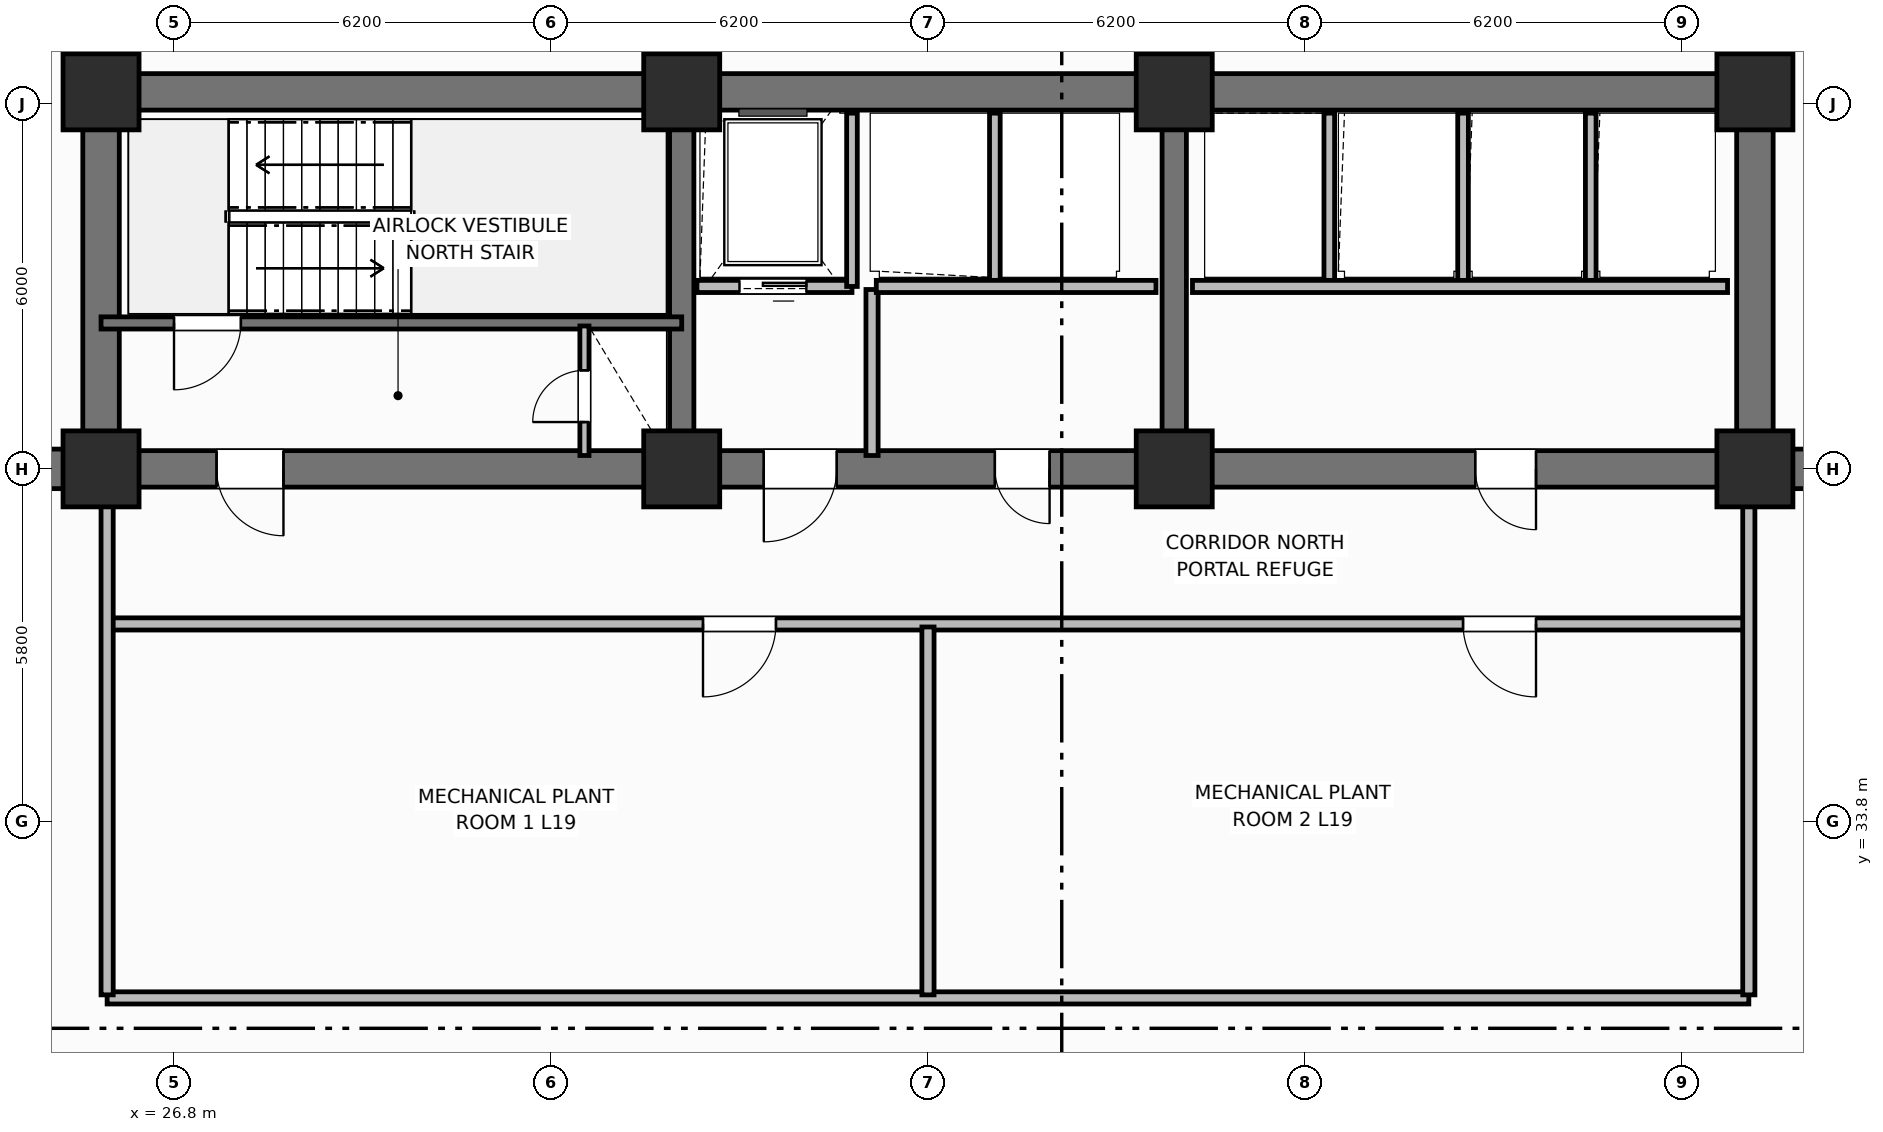
"""IFC4 building model, lengths in metres.
Left out: names, types, materials, properties, quantities, classifications, styles, units other than length and angle.
Written with IfcOpenShell. Run it as: python <this file> out.ifc"""

import sys

from ifc_helpers import new_model, si_unit, direction, frame, frame_2d, origin, origin_2d, place, context, subcontext, project, spatial, rectangle, extrude, element, fill, save


model = new_model("IFC4")
c1 = context("Model", 3, precision=1e-05, world=origin(), true_north=direction((0.0, 1.0)))
c2 = subcontext(c1, "Body", "Model", "MODEL_VIEW")
j1 = project(units=[si_unit("LENGTHUNIT", "METRE"), si_unit("PLANEANGLEUNIT", "RADIAN")], contexts=[c1])
p1 = place(None, origin())
s1 = spatial("IfcSite", under=j1, at=p1, CompositionType="ELEMENT")
p2 = place(p1, origin())
s2 = spatial("IfcBuilding", under=s1, at=p2, CompositionType="ELEMENT")
p3 = place(p2, frame((0.0, 0.0, 76.9)))
s3 = spatial("IfcBuildingStorey", under=s2, at=p3, CompositionType="ELEMENT", Elevation=76.9)
p4 = place(p3, frame((25.6, 45.8, 0.0), z_axis=(0.0, 0.0, 1.0), x_axis=(1.0, 0.0, 0.0)))
e1 = element("IfcWall", 1, at=p4, inside=s3, PredefinedType="SHEAR", context=c2, shape_type="SweptSolid", body=[
    extrude(rectangle(XDim=27.2, YDim=0.6, at=frame_2d((13.6, 0.0))), origin(), (0.0, 0.0, 1.0), 7.2),
])
for number, where, z_axis, x_axis in (
    (2, (25.6, 39.9, 0.0), (0.0, 0.0, 1.0), (0.0, 1.0, 0.0)),
    (3, (52.8, 39.9, 0.0), (0.0, 0.0, 1.0), (0.0, 1.0, 0.0)),
):
    element("IfcWall", number, at=place(p3, frame(where, z_axis=z_axis, x_axis=x_axis)), inside=s3, PredefinedType="SHEAR", context=c2, shape_type="SweptSolid", body=[
        extrude(rectangle(XDim=5.6, YDim=0.6, at=frame_2d((2.8, 0.0))), origin(), (0.0, 0.0, 1.0), 7.2),
    ])
p5 = place(p3, frame((52.8, 39.6, 0.0), z_axis=(0.0, 0.0, 1.0), x_axis=(-1.0, 0.0, 0.0)))
e4 = element("IfcWall", 4, at=p5, inside=s3, PredefinedType="SHEAR", context=c2, shape_type="SweptSolid", body=[
    extrude(rectangle(XDim=27.2, YDim=0.6, at=frame_2d((13.6, 0.0))), origin(), (0.0, 0.0, 1.0), 7.2),
])
p6 = place(p5, frame((24.2, 0.0, 0.0)))
e5 = element("IfcOpeningElement", 5, at=p6, cuts=e4, PredefinedType="OPENING", context=c2, shape_type="SweptSolid", body=[
    extrude(rectangle(XDim=1.1, YDim=2.15, at=frame_2d((0.55, 1.075))), frame((0.0, 0.31, 0.0), z_axis=(0.0, -1.0, 0.0), x_axis=(1.0, 0.0, 0.0)), (0.0, 0.0, 1.0), 0.62),
])
p7 = place(p5, frame((15.1, 0.0, 0.0)))
e6 = element("IfcOpeningElement", 6, at=p7, cuts=e4, PredefinedType="OPENING", context=c2, shape_type="SweptSolid", body=[
    extrude(rectangle(XDim=1.2, YDim=2.15, at=frame_2d((0.6, 1.075))), frame((0.0, 0.31, 0.0), z_axis=(0.0, -1.0, 0.0), x_axis=(1.0, 0.0, 0.0)), (0.0, 0.0, 1.0), 0.62),
])
p8 = place(p5, frame((11.6, 0.0, 0.0)))
e7 = element("IfcOpeningElement", 7, at=p8, cuts=e4, PredefinedType="OPENING", context=c2, shape_type="SweptSolid", body=[
    extrude(rectangle(XDim=0.9, YDim=2.1, at=frame_2d((0.45, 1.05))), frame((0.0, 0.31, 0.0), z_axis=(0.0, -1.0, 0.0), x_axis=(1.0, 0.0, 0.0)), (0.0, 0.0, 1.0), 0.62),
])
p9 = place(p5, frame((3.6, 0.0, 0.0)))
e8 = element("IfcOpeningElement", 8, at=p9, cuts=e4, PredefinedType="OPENING", context=c2, shape_type="SweptSolid", body=[
    extrude(rectangle(XDim=1.0, YDim=2.15, at=frame_2d((0.5, 1.075))), frame((0.0, 0.31, 0.0), z_axis=(0.0, -1.0, 0.0), x_axis=(1.0, 0.0, 0.0)), (0.0, 0.0, 1.0), 0.62),
])
for number, where, z_axis, x_axis in (
    (9, (35.15, 39.9, 0.0), (0.0, 0.0, 1.0), (0.0, 1.0, 0.0)),
    (10, (43.25, 39.9, 0.0), (0.0, 0.0, 1.0), (0.0, 1.0, 0.0)),
):
    element("IfcWall", number, at=place(p3, frame(where, z_axis=z_axis, x_axis=x_axis)), inside=s3, PredefinedType="SHEAR", context=c2, shape_type="SweptSolid", body=[
        extrude(rectangle(XDim=5.6, YDim=0.4, at=frame_2d((2.8, 0.0))), origin(), (0.0, 0.0, 1.0), 7.2),
    ])
for number, where, z_axis, x_axis in (
    (11, (25.6, 39.6, 0.0), (0.0, 0.0, 1.0), (1.0, 0.0, 0.0)),
    (12, (25.6, 45.8, 0.0), (0.0, 0.0, 1.0), (1.0, 0.0, 0.0)),
    (13, (35.15, 39.6, 0.0), (0.0, 0.0, 1.0), (1.0, 0.0, 0.0)),
    (14, (35.15, 45.8, 0.0), (0.0, 0.0, 1.0), (1.0, 0.0, 0.0)),
    (15, (43.25, 39.6, 0.0), (0.0, 0.0, 1.0), (1.0, 0.0, 0.0)),
    (16, (43.25, 45.8, 0.0), (0.0, 0.0, 1.0), (1.0, 0.0, 0.0)),
    (17, (52.8, 39.6, 0.0), (0.0, 0.0, 1.0), (1.0, 0.0, 0.0)),
    (18, (52.8, 45.8, 0.0), (0.0, 0.0, 1.0), (1.0, 0.0, 0.0)),
):
    element("IfcColumn", number, at=place(p3, frame(where, z_axis=z_axis, x_axis=x_axis)), inside=s3, PredefinedType="COLUMN", context=c2, shape_type="SweptSolid", body=[
        extrude(rectangle(XDim=1.25, YDim=1.25, at=origin_2d()), origin(), (0.0, 0.0, 1.0), 7.2),
    ])
for number, where, z_axis, x_axis in (
    (19, (15.05, 39.6, 0.0), (0.0, 0.0, 1.0), (1.0, 0.0, 0.0)),
    (20, (52.8, 39.6, 0.0), (0.0, 0.0, 1.0), (1.0, 0.0, 0.0)),
):
    element("IfcWall", number, at=place(p3, frame(where, z_axis=z_axis, x_axis=x_axis)), inside=s3, PredefinedType="SHEAR", context=c2, shape_type="SweptSolid", body=[
        extrude(rectangle(XDim=10.55, YDim=0.65, at=frame_2d((5.275, 0.0))), origin(), (0.0, 0.0, 1.0), 6.92),
    ])
p10 = place(p3, frame((35.15, 42.0, 0.0), z_axis=(0.0, 0.0, 1.0), x_axis=(-1.0, 0.0, 0.0)))
e21 = element("IfcWall", 21, at=p10, inside=s3, PredefinedType="SHEAR", context=c2, shape_type="SweptSolid", body=[
    extrude(rectangle(XDim=9.55, YDim=0.2, at=frame_2d((4.775, 0.0))), origin(), (0.0, 0.0, 1.0), 7.2),
])
p11 = place(p10, frame((7.25, 0.0, 0.0)))
e22 = element("IfcOpeningElement", 22, at=p11, cuts=e21, PredefinedType="OPENING", context=c2, shape_type="SweptSolid", body=[
    extrude(rectangle(XDim=1.1, YDim=2.15, at=frame_2d((0.55, 1.075))), frame((0.0, 0.11, 0.0), z_axis=(0.0, -1.0, 0.0), x_axis=(1.0, 0.0, 0.0)), (0.0, 0.0, 1.0), 0.22),
])
p12 = place(p3, frame((33.55, 39.82, 0.0), z_axis=(0.0, 0.0, 1.0), x_axis=(0.0, 1.0, 0.0)))
e23 = element("IfcWall", 23, at=p12, inside=s3, PredefinedType="PARTITIONING", context=c2, shape_type="SweptSolid", body=[
    extrude(rectangle(XDim=2.13, YDim=0.15, at=frame_2d((1.065, 0.0))), origin(), (0.0, 0.0, 1.0), 5.98),
])
p13 = place(p12, frame((0.55, 0.0, 0.0)))
e24 = element("IfcOpeningElement", 24, at=p13, cuts=e23, PredefinedType="OPENING", context=c2, shape_type="SweptSolid", body=[
    extrude(rectangle(XDim=0.85, YDim=2.05, at=frame_2d((0.425, 1.025))), frame((0.0, 0.085, 0.0), z_axis=(0.0, -1.0, 0.0), x_axis=(1.0, 0.0, 0.0)), (0.0, 0.0, 1.0), 0.17),
])
p14 = place(p3, frame((37.95, 42.6, 0.0), z_axis=(0.0, 0.0, 1.0), x_axis=(-1.0, 0.0, 0.0)))
e25 = element("IfcWall", 25, at=p14, inside=s3, PredefinedType="PARTITIONING", context=c2, shape_type="SweptSolid", body=[
    extrude(rectangle(XDim=2.55, YDim=0.2, at=frame_2d((1.275, 0.0))), origin(), (0.0, 0.0, 1.0), 5.8),
])
p15 = place(p14, frame((0.75, 0.0, 0.0)))
e26 = element("IfcOpeningElement", 26, at=p15, cuts=e25, PredefinedType="OPENING", context=c2, shape_type="SweptSolid", body=[
    extrude(rectangle(XDim=1.1, YDim=2.15, at=frame_2d((0.55, 1.075))), frame((0.0, 0.11, 0.0), z_axis=(0.0, -1.0, 0.0), x_axis=(1.0, 0.0, 0.0)), (0.0, 0.0, 1.0), 0.22),
])
p16 = place(p3, frame((37.95, 42.6, 0.0), z_axis=(0.0, 0.0, 1.0), x_axis=(0.0, 1.0, 0.0)))
e27 = element("IfcWall", 27, at=p16, inside=s3, PredefinedType="PARTITIONING", context=c2, shape_type="SweptSolid", body=[
    extrude(rectangle(XDim=2.85, YDim=0.175, at=frame_2d((1.425, 0.0))), origin(), (0.0, 0.0, 1.0), 5.98),
])
p17 = place(p3, frame((38.28, 39.82, 0.0), z_axis=(0.0, 0.0, 1.0), x_axis=(0.0, 1.0, 0.0)))
e28 = element("IfcWall", 28, at=p17, inside=s3, PredefinedType="PARTITIONING", context=c2, shape_type="SweptSolid", body=[
    extrude(rectangle(XDim=2.73, YDim=0.2, at=frame_2d((1.365, 0.0))), origin(), (0.0, 0.0, 1.0), 5.98),
])
p18 = place(p3, frame((40.3, 42.65, 0.0), z_axis=(0.0, 0.0, 1.0), x_axis=(0.0, 1.0, 0.0)))
e29 = element("IfcWall", 29, at=p18, inside=s3, PredefinedType="PARTITIONING", context=c2, shape_type="SweptSolid", body=[
    extrude(rectangle(XDim=2.8, YDim=0.175, at=frame_2d((1.4, 0.0))), origin(), (0.0, 0.0, 1.0), 5.98),
])
p19 = place(p3, frame((42.95, 42.6, 0.0), z_axis=(0.0, 0.0, 1.0), x_axis=(-1.0, 0.0, 0.0)))
e30 = element("IfcWall", 30, at=p19, inside=s3, PredefinedType="PARTITIONING", context=c2, shape_type="SweptSolid", body=[
    extrude(rectangle(XDim=4.6, YDim=0.2, at=frame_2d((2.3, 0.0))), origin(), (0.0, 0.0, 1.0), 5.8),
])
for number, where, z_axis, x_axis in (
    (31, (45.8, 42.65, 0.0), (0.0, 0.0, 1.0), (0.0, 1.0, 0.0)),
    (32, (48.0, 42.65, 0.0), (0.0, 0.0, 1.0), (0.0, 1.0, 0.0)),
    (33, (50.1, 42.65, 0.0), (0.0, 0.0, 1.0), (0.0, 1.0, 0.0)),
):
    element("IfcWall", number, at=place(p3, frame(where, z_axis=z_axis, x_axis=x_axis)), inside=s3, PredefinedType="PARTITIONING", context=c2, shape_type="SweptSolid", body=[
        extrude(rectangle(XDim=2.8, YDim=0.175, at=frame_2d((1.4, 0.0))), origin(), (0.0, 0.0, 1.0), 5.98),
    ])
p20 = place(p3, frame((52.35, 42.6, 0.0), z_axis=(0.0, 0.0, 1.0), x_axis=(-1.0, 0.0, 0.0)))
e34 = element("IfcWall", 34, at=p20, inside=s3, PredefinedType="PARTITIONING", context=c2, shape_type="SweptSolid", body=[
    extrude(rectangle(XDim=8.8, YDim=0.2, at=frame_2d((4.4, 0.0))), origin(), (0.0, 0.0, 1.0), 5.98),
])
p21 = place(p3, frame((52.7, 37.05, 0.0), z_axis=(0.0, 0.0, 1.0), x_axis=(-1.0, 0.0, 0.0)))
e35 = element("IfcWall", 35, at=p21, inside=s3, PredefinedType="PARTITIONING", context=c2, shape_type="SweptSolid", body=[
    extrude(rectangle(XDim=27.0, YDim=0.2, at=frame_2d((13.5, 0.0))), origin(), (0.0, 0.0, 1.0), 5.98),
])
p22 = place(p21, frame((3.5, 0.0, 0.0)))
e36 = element("IfcOpeningElement", 36, at=p22, cuts=e35, PredefinedType="OPENING", context=c2, shape_type="SweptSolid", body=[
    extrude(rectangle(XDim=1.2, YDim=2.15, at=frame_2d((0.6, 1.075))), frame((0.0, 0.11, 0.0), z_axis=(0.0, -1.0, 0.0), x_axis=(1.0, 0.0, 0.0)), (0.0, 0.0, 1.0), 0.22),
])
p23 = place(p21, frame((16.0, 0.0, 0.0)))
e37 = element("IfcOpeningElement", 37, at=p23, cuts=e35, PredefinedType="OPENING", context=c2, shape_type="SweptSolid", body=[
    extrude(rectangle(XDim=1.2, YDim=2.15, at=frame_2d((0.6, 1.075))), frame((0.0, 0.11, 0.0), z_axis=(0.0, -1.0, 0.0), x_axis=(1.0, 0.0, 0.0)), (0.0, 0.0, 1.0), 0.22),
])
p24 = place(p3, frame((25.7, 30.9, 0.0), z_axis=(0.0, 0.0, 1.0), x_axis=(1.0, 0.0, 0.0)))
e38 = element("IfcWall", 38, at=p24, inside=s3, PredefinedType="PARTITIONING", context=c2, shape_type="SweptSolid", body=[
    extrude(rectangle(XDim=27.0, YDim=0.2, at=frame_2d((13.5, 0.0))), origin(), (0.0, 0.0, 1.0), 5.98),
])
p25 = place(p3, frame((39.2, 30.95, 0.0), z_axis=(0.0, 0.0, 1.0), x_axis=(0.0, 1.0, 0.0)))
e39 = element("IfcWall", 39, at=p25, inside=s3, PredefinedType="PARTITIONING", context=c2, shape_type="SweptSolid", body=[
    extrude(rectangle(XDim=6.05, YDim=0.2, at=frame_2d((3.025, 0.0))), origin(), (0.0, 0.0, 1.0), 5.98),
])
for number, where, z_axis, x_axis in (
    (40, (25.7, 30.95, 0.0), (0.0, 0.0, 1.0), (0.0, 1.0, 0.0)),
    (41, (52.7, 30.95, 0.0), (0.0, 0.0, 1.0), (0.0, 1.0, 0.0)),
):
    element("IfcWall", number, at=place(p3, frame(where, z_axis=z_axis, x_axis=x_axis)), inside=s3, PredefinedType="PARTITIONING", context=c2, shape_type="SweptSolid", body=[
        extrude(rectangle(XDim=8.25, YDim=0.2, at=frame_2d((4.125, 0.0))), origin(), (0.0, 0.0, 1.0), 5.98),
    ])
p26 = place(p11, origin())
e42 = element("IfcDoor", 42, at=p26, inside=s3, OperationType="SINGLE_SWING_RIGHT", PredefinedType="DOOR", context=c2, shape_type="SweptSolid", body=[
    extrude(rectangle(XDim=1.1, YDim=2.15, at=frame_2d((0.55, 1.075))), frame((0.0, 0.025, 0.0), z_axis=(0.0, -1.0, 0.0), x_axis=(1.0, 0.0, 0.0)), (0.0, 0.0, 1.0), 0.05),
])
fill(e22, e42)
p27 = place(p13, origin())
e43 = element("IfcDoor", 43, at=p27, inside=s3, OperationType="SINGLE_SWING_LEFT", PredefinedType="TRAPDOOR", context=c2, shape_type="SweptSolid", body=[
    extrude(rectangle(XDim=0.85, YDim=2.05, at=frame_2d((0.425, 1.025))), frame((0.0, 0.025, 0.0), z_axis=(0.0, -1.0, 0.0), x_axis=(1.0, 0.0, 0.0)), (0.0, 0.0, 1.0), 0.05),
])
fill(e24, e43)
p28 = place(p15, origin())
e44 = element("IfcDoor", 44, at=p28, inside=s3, OperationType="SLIDING_TO_LEFT", PredefinedType="DOOR", context=c2, shape_type="SweptSolid", body=[
    extrude(rectangle(XDim=1.1, YDim=2.15, at=frame_2d((0.55, 1.075))), frame((0.0, 0.025, 0.0), z_axis=(0.0, -1.0, 0.0), x_axis=(1.0, 0.0, 0.0)), (0.0, 0.0, 1.0), 0.05),
])
fill(e26, e44)
p29 = place(p22, origin())
e45 = element("IfcDoor", 45, at=p29, inside=s3, OperationType="SINGLE_SWING_LEFT", PredefinedType="DOOR", context=c2, shape_type="SweptSolid", body=[
    extrude(rectangle(XDim=1.2, YDim=2.15, at=frame_2d((0.6, 1.075))), frame((0.0, 0.025, 0.0), z_axis=(0.0, -1.0, 0.0), x_axis=(1.0, 0.0, 0.0)), (0.0, 0.0, 1.0), 0.05),
])
fill(e36, e45)
p30 = place(p23, origin())
e46 = element("IfcDoor", 46, at=p30, inside=s3, OperationType="SINGLE_SWING_RIGHT", PredefinedType="DOOR", context=c2, shape_type="SweptSolid", body=[
    extrude(rectangle(XDim=1.2, YDim=2.15, at=frame_2d((0.6, 1.075))), frame((0.0, 0.025, 0.0), z_axis=(0.0, -1.0, 0.0), x_axis=(1.0, 0.0, 0.0)), (0.0, 0.0, 1.0), 0.05),
])
fill(e37, e46)
p31 = place(p6, origin())
e47 = element("IfcDoor", 47, at=p31, inside=s3, OperationType="SINGLE_SWING_LEFT", PredefinedType="DOOR", context=c2, shape_type="SweptSolid", body=[
    extrude(rectangle(XDim=1.1, YDim=2.15, at=frame_2d((0.55, 1.075))), frame((0.0, 0.025, 0.0), z_axis=(0.0, -1.0, 0.0), x_axis=(1.0, 0.0, 0.0)), (0.0, 0.0, 1.0), 0.05),
])
fill(e5, e47)
p32 = place(p7, origin())
e48 = element("IfcDoor", 48, at=p32, inside=s3, OperationType="SINGLE_SWING_RIGHT", PredefinedType="DOOR", context=c2, shape_type="SweptSolid", body=[
    extrude(rectangle(XDim=1.2, YDim=2.15, at=frame_2d((0.6, 1.075))), frame((0.0, 0.025, 0.0), z_axis=(0.0, -1.0, 0.0), x_axis=(1.0, 0.0, 0.0)), (0.0, 0.0, 1.0), 0.05),
])
fill(e6, e48)
p33 = place(p8, origin())
e49 = element("IfcDoor", 49, at=p33, inside=s3, OperationType="SINGLE_SWING_LEFT", PredefinedType="DOOR", context=c2, shape_type="SweptSolid", body=[
    extrude(rectangle(XDim=0.9, YDim=2.1, at=frame_2d((0.45, 1.05))), frame((0.0, 0.025, 0.0), z_axis=(0.0, -1.0, 0.0), x_axis=(1.0, 0.0, 0.0)), (0.0, 0.0, 1.0), 0.05),
])
fill(e7, e49)
p34 = place(p9, origin())
e50 = element("IfcDoor", 50, at=p34, inside=s3, OperationType="SINGLE_SWING_LEFT", PredefinedType="DOOR", context=c2, shape_type="SweptSolid", body=[
    extrude(rectangle(XDim=1.0, YDim=2.15, at=frame_2d((0.5, 1.075))), frame((0.0, 0.025, 0.0), z_axis=(0.0, -1.0, 0.0), x_axis=(1.0, 0.0, 0.0)), (0.0, 0.0, 1.0), 0.05),
])
fill(e8, e50)
save(model, sys.argv[1])
